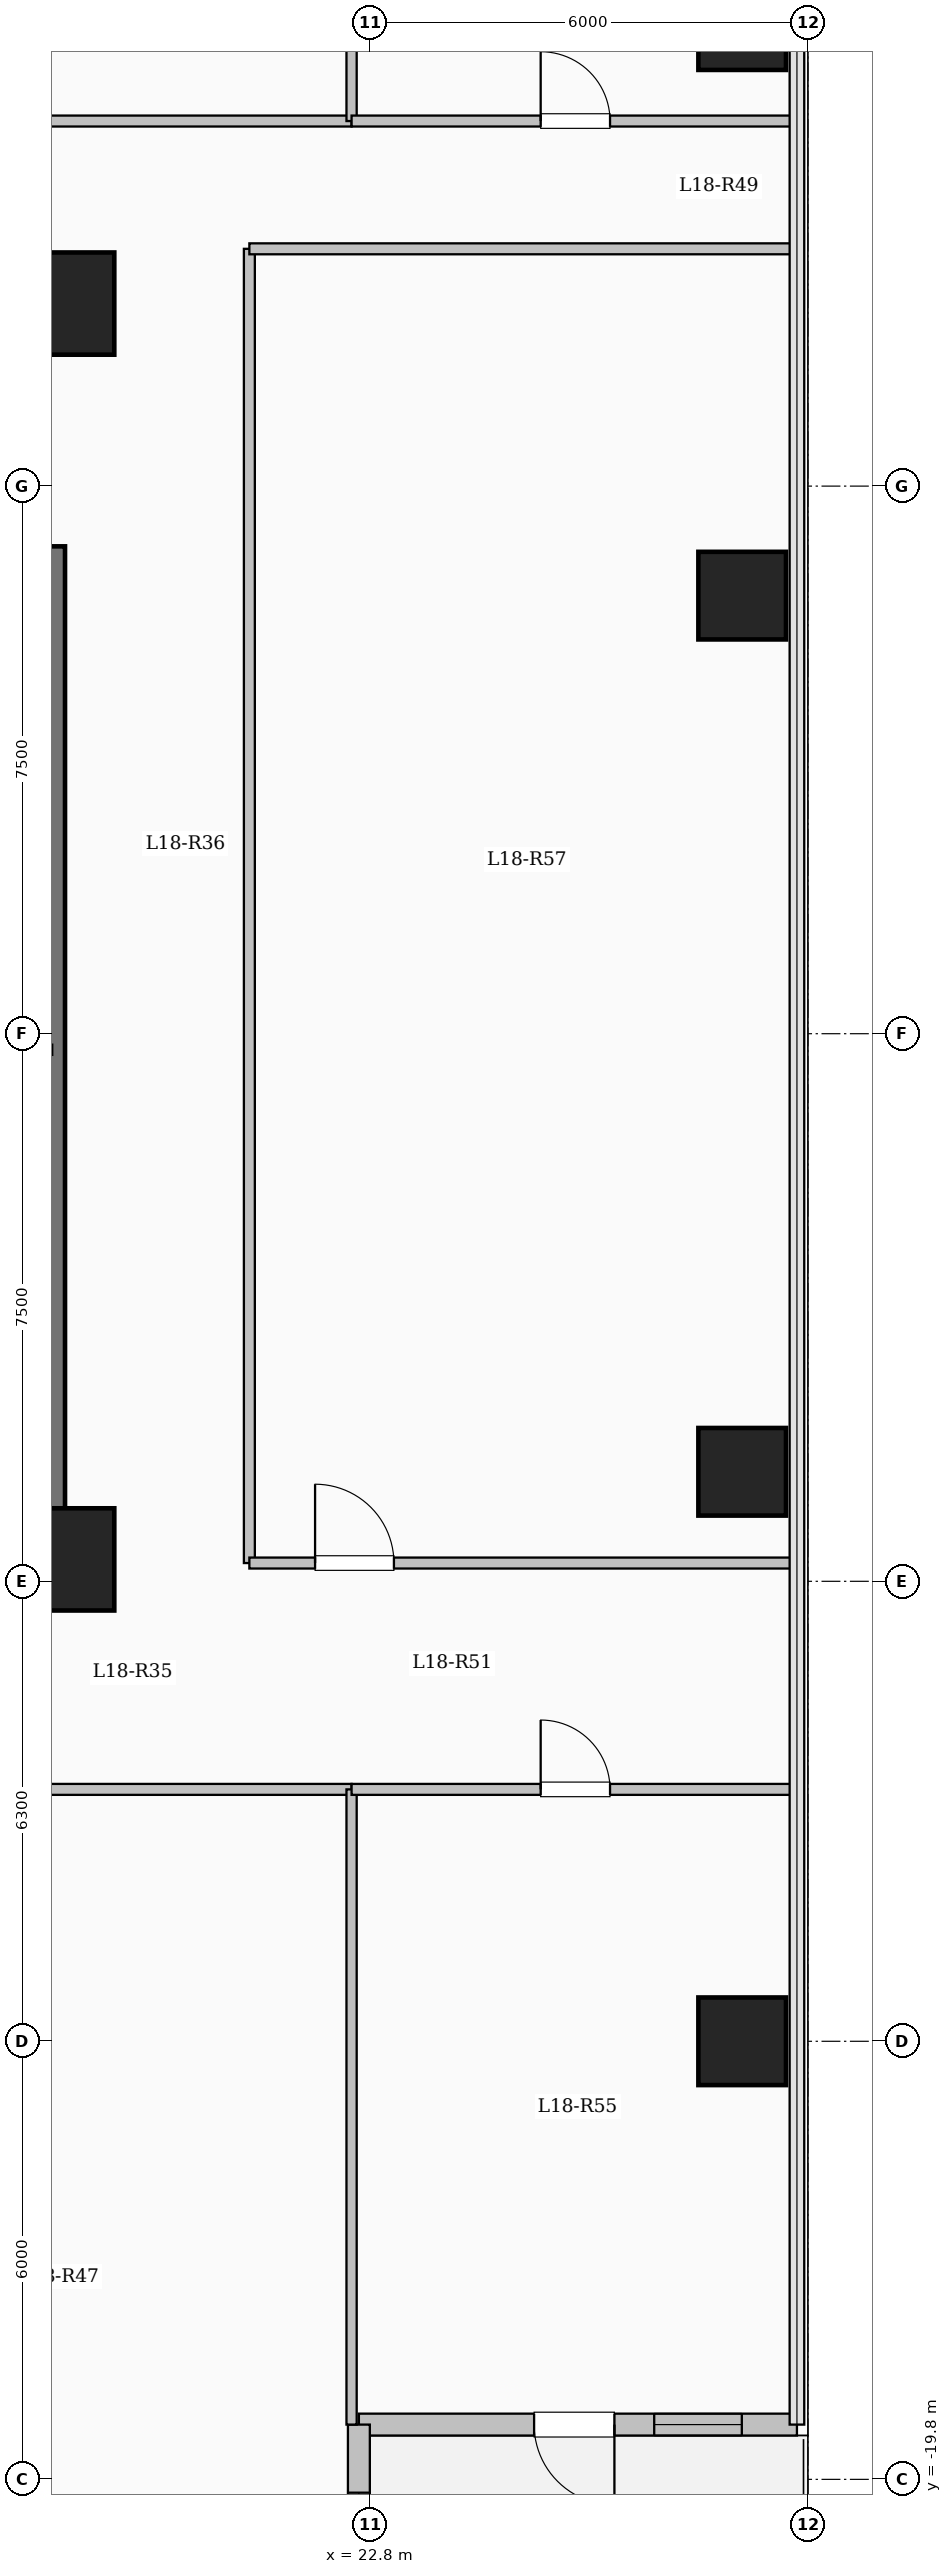
"""IFC4 building model, lengths in metres.
Left out: names, types, materials, properties, quantities, classifications, styles, units other than length and angle.
Written with IfcOpenShell. Run it as: python <this file> out.ifc"""

import sys

from ifc_helpers import new_model, si_unit, direction, frame, frame_2d, origin, origin_2d, place, context, subcontext, project, spatial, rectangle, extrude, element, fill, save


model = new_model("IFC4")
c1 = context("Model", 3, precision=1e-05, world=origin(), true_north=direction((0.0, 1.0)))
c2 = subcontext(c1, "Body", "Model", "MODEL_VIEW")
j1 = project(units=[si_unit("LENGTHUNIT", "METRE"), si_unit("PLANEANGLEUNIT", "RADIAN")], contexts=[c1])
p1 = place(None, origin())
s1 = spatial("IfcSite", under=j1, at=p1, CompositionType="ELEMENT")
p2 = place(p1, origin())
s2 = spatial("IfcBuilding", under=s1, at=p2, CompositionType="ELEMENT")
p3 = place(p2, frame((0.0, 0.0, 68.7)))
s3 = spatial("IfcBuildingStorey", under=s2, at=p3, CompositionType="ELEMENT", Elevation=68.7)
for number, where, z_axis, x_axis in (
    (1, (18.6, -7.2, 0.0), (0.0, 0.0, 1.0), (1.0, 0.0, 0.0)),
    (2, (18.6, 10.0, 0.0), (0.0, 0.0, 1.0), (1.0, 0.0, 0.0)),
):
    element("IfcColumn", number, at=place(p3, frame(where, z_axis=z_axis, x_axis=x_axis)), inside=s3, PredefinedType="COLUMN", context=c2, shape_type="SweptSolid", body=[
        extrude(rectangle(XDim=1.4, YDim=1.4, at=origin_2d()), origin(), (0.0, 0.0, 1.0), 4.5),
    ])
for number, where, z_axis, x_axis in (
    (3, (27.9, -13.8, 0.0), (0.0, 0.0, 1.0), (1.0, 0.0, 0.0)),
    (4, (27.9, -6.0, 0.0), (0.0, 0.0, 1.0), (1.0, 0.0, 0.0)),
    (5, (27.9, 6.0, 0.0), (0.0, 0.0, 1.0), (1.0, 0.0, 0.0)),
    (6, (27.9, 13.8, 0.0), (0.0, 0.0, 1.0), (1.0, 0.0, 0.0)),
):
    element("IfcColumn", number, at=place(p3, frame(where, z_axis=z_axis, x_axis=x_axis)), inside=s3, PredefinedType="COLUMN", context=c2, shape_type="SweptSolid", body=[
        extrude(rectangle(XDim=1.2, YDim=1.2, at=origin_2d()), origin(), (0.0, 0.0, 1.0), 4.5),
    ])
p4 = place(p3, frame((28.65, -19.05, 0.0), z_axis=(0.0, 0.0, 1.0), x_axis=(-1.0, 0.0, 0.0)))
e7 = element("IfcWall", 7, at=p4, inside=s3, PredefinedType="SOLIDWALL", context=c2, shape_type="SweptSolid", body=[
    extrude(rectangle(XDim=6.0, YDim=0.3, at=frame_2d((3.0, 0.0))), origin(), (0.0, 0.0, 1.0), 4.2),
])
p5 = place(p4, frame((2.5, 0.0, 0.0)))
e8 = element("IfcOpeningElement", 8, at=p5, cuts=e7, PredefinedType="OPENING", context=c2, shape_type="SweptSolid", body=[
    extrude(rectangle(XDim=1.1, YDim=2.2, at=frame_2d((0.55, 1.1))), frame((0.0, 0.16, 0.0), z_axis=(0.0, -1.0, 0.0), x_axis=(1.0, 0.0, 0.0)), (0.0, 0.0, 1.0), 0.32),
])
p6 = place(p4, frame((0.755, 0.0, 0.95)))
e9 = element("IfcOpeningElement", 9, at=p6, cuts=e7, PredefinedType="OPENING", context=c2, shape_type="SweptSolid", body=[
    extrude(rectangle(XDim=1.2, YDim=1.5, at=frame_2d((0.6, 0.75))), frame((0.0, 0.16, 0.0), z_axis=(0.0, -1.0, 0.0), x_axis=(1.0, 0.0, 0.0)), (0.0, 0.0, 1.0), 0.32),
])
p7 = place(p3, frame((22.65, -19.05, 0.0), z_axis=(0.0, 0.0, 1.0), x_axis=(0.0, -1.0, 0.0)))
e10 = element("IfcWall", 10, at=p7, inside=s3, PredefinedType="SOLIDWALL", context=c2, shape_type="SweptSolid", body=[
    extrude(rectangle(XDim=4.5, YDim=0.3, at=frame_2d((2.25, 0.0))), origin(), (0.0, 0.0, 1.0), 4.2),
])
p8 = place(p7, frame((0.933, 0.0, 0.85)))
e11 = element("IfcOpeningElement", 11, at=p8, cuts=e10, PredefinedType="OPENING", context=c2, shape_type="SweptSolid", body=[
    extrude(rectangle(XDim=2.6, YDim=2.4, at=frame_2d((1.3, 1.2))), frame((0.0, 0.16, 0.0), z_axis=(0.0, -1.0, 0.0), x_axis=(1.0, 0.0, 0.0)), (0.0, 0.0, 1.0), 0.32),
])
p9 = place(p3, frame((18.45, -7.375, 0.0), z_axis=(0.0, 0.0, 1.0), x_axis=(0.0, 1.0, 0.0)))
e12 = element("IfcWall", 12, at=p9, inside=s3, PredefinedType="SHEAR", context=c2, shape_type="SweptSolid", body=[
    extrude(rectangle(XDim=14.05, YDim=0.35, at=frame_2d((7.025, 0.0))), origin(), (0.0, 0.0, 1.0), 4.5),
])
p10 = place(p3, frame((10.075, -7.2, 0.0), z_axis=(0.0, 0.0, 1.0), x_axis=(1.0, 0.0, 0.0)))
e13 = element("IfcWall", 13, at=p10, inside=s3, PredefinedType="SHEAR", context=c2, shape_type="SweptSolid", body=[
    extrude(rectangle(XDim=8.55, YDim=0.35, at=frame_2d((4.275, 0.0))), origin(), (0.0, 0.0, 1.0), 4.5),
])
p11 = place(p3, frame((3.85, 12.5, 0.0), z_axis=(0.0, 0.0, 1.0), x_axis=(1.0, 0.0, 0.0)))
e14 = element("IfcWall", 14, at=p11, inside=s3, PredefinedType="PARTITIONING", context=c2, shape_type="SweptSolid", body=[
    extrude(rectangle(XDim=18.7, YDim=0.15, at=frame_2d((9.35, 0.0))), origin(), (0.0, 0.0, 1.0), 4.2),
])
p12 = place(p11, frame((0.8, 0.0, 0.0)))
e15 = element("IfcOpeningElement", 15, at=p12, cuts=e14, PredefinedType="OPENING", context=c2, shape_type="SweptSolid", body=[
    extrude(rectangle(XDim=0.95, YDim=2.15, at=frame_2d((0.475, 1.075))), frame((0.0, 0.085, 0.0), z_axis=(0.0, -1.0, 0.0), x_axis=(1.0, 0.0, 0.0)), (0.0, 0.0, 1.0), 0.17),
])
p13 = place(p11, frame((3.6, 0.0, 0.0)))
e16 = element("IfcOpeningElement", 16, at=p13, cuts=e14, PredefinedType="OPENING", context=c2, shape_type="SweptSolid", body=[
    extrude(rectangle(XDim=0.95, YDim=2.15, at=frame_2d((0.475, 1.075))), frame((0.0, 0.085, 0.0), z_axis=(0.0, -1.0, 0.0), x_axis=(1.0, 0.0, 0.0)), (0.0, 0.0, 1.0), 0.17),
])
p14 = place(p11, frame((6.55, 0.0, 0.0)))
e17 = element("IfcOpeningElement", 17, at=p14, cuts=e14, PredefinedType="OPENING", context=c2, shape_type="SweptSolid", body=[
    extrude(rectangle(XDim=1.08, YDim=2.15, at=frame_2d((0.54, 1.075))), frame((0.0, 0.085, 0.0), z_axis=(0.0, -1.0, 0.0), x_axis=(1.0, 0.0, 0.0)), (0.0, 0.0, 1.0), 0.17),
])
p15 = place(p11, frame((11.97, 0.0, 0.0)))
e18 = element("IfcOpeningElement", 18, at=p15, cuts=e14, PredefinedType="OPENING", context=c2, shape_type="SweptSolid", body=[
    extrude(rectangle(XDim=1.2, YDim=2.15, at=frame_2d((0.6, 1.075))), frame((0.0, 0.085, 0.0), z_axis=(0.0, -1.0, 0.0), x_axis=(1.0, 0.0, 0.0)), (0.0, 0.0, 1.0), 0.17),
])
p16 = place(p3, frame((21.15, -7.25, 0.0), z_axis=(0.0, 0.0, 1.0), x_axis=(0.0, 1.0, 0.0)))
e19 = element("IfcWall", 19, at=p16, inside=s3, PredefinedType="PARTITIONING", context=c2, shape_type="SweptSolid", body=[
    extrude(rectangle(XDim=18.0, YDim=0.15, at=frame_2d((9.0, 0.0))), origin(), (0.0, 0.0, 1.0), 3.635),
])
p17 = place(p3, frame((8.55, -10.35, 0.0), z_axis=(0.0, 0.0, 1.0), x_axis=(1.0, 0.0, 0.0)))
e20 = element("IfcWall", 20, at=p17, inside=s3, PredefinedType="PARTITIONING", context=c2, shape_type="SweptSolid", body=[
    extrude(rectangle(XDim=14.0, YDim=0.15, at=frame_2d((7.0, 0.0))), origin(), (0.0, 0.0, 1.0), 4.2),
])
p18 = place(p17, frame((1.1, 0.0, 0.0)))
e21 = element("IfcOpeningElement", 21, at=p18, cuts=e20, PredefinedType="OPENING", context=c2, shape_type="SweptSolid", body=[
    extrude(rectangle(XDim=1.08, YDim=2.15, at=frame_2d((0.54, 1.075))), frame((0.0, 0.085, 0.0), z_axis=(0.0, -1.0, 0.0), x_axis=(1.0, 0.0, 0.0)), (0.0, 0.0, 1.0), 0.17),
])
p19 = place(p17, frame((6.909, 0.0, 0.0)))
e22 = element("IfcOpeningElement", 22, at=p19, cuts=e20, PredefinedType="OPENING", context=c2, shape_type="SweptSolid", body=[
    extrude(rectangle(XDim=1.2, YDim=2.15, at=frame_2d((0.6, 1.075))), frame((0.0, 0.085, 0.0), z_axis=(0.0, -1.0, 0.0), x_axis=(1.0, 0.0, 0.0)), (0.0, 0.0, 1.0), 0.17),
])
p20 = place(p3, frame((21.15, -7.25, 0.0), z_axis=(0.0, 0.0, 1.0), x_axis=(1.0, 0.0, 0.0)))
e23 = element("IfcWall", 23, at=p20, inside=s3, PredefinedType="PARTITIONING", context=c2, shape_type="SweptSolid", body=[
    extrude(rectangle(XDim=7.53, YDim=0.15, at=frame_2d((3.765, 0.0))), origin(), (0.0, 0.0, 1.0), 4.2),
])
p21 = place(p20, frame((0.9, 0.0, 0.0)))
e24 = element("IfcOpeningElement", 24, at=p21, cuts=e23, PredefinedType="OPENING", context=c2, shape_type="SweptSolid", body=[
    extrude(rectangle(XDim=1.08, YDim=2.15, at=frame_2d((0.54, 1.075))), frame((0.0, 0.085, 0.0), z_axis=(0.0, -1.0, 0.0), x_axis=(1.0, 0.0, 0.0)), (0.0, 0.0, 1.0), 0.17),
])
p22 = place(p3, frame((21.15, 10.75, 0.0), z_axis=(0.0, 0.0, 1.0), x_axis=(1.0, 0.0, 0.0)))
e25 = element("IfcWall", 25, at=p22, inside=s3, PredefinedType="PARTITIONING", context=c2, shape_type="SweptSolid", body=[
    extrude(rectangle(XDim=7.53, YDim=0.15, at=frame_2d((3.765, 0.0))), origin(), (0.0, 0.0, 1.0), 4.2),
])
p23 = place(p3, frame((22.55, -19.05, 0.0), z_axis=(0.0, 0.0, 1.0), x_axis=(0.0, 1.0, 0.0)))
e26 = element("IfcWall", 26, at=p23, inside=s3, PredefinedType="PARTITIONING", context=c2, shape_type="SweptSolid", body=[
    extrude(rectangle(XDim=8.7, YDim=0.14, at=frame_2d((4.35, 0.0))), origin(), (0.0, 0.0, 1.0), 4.2),
])
p24 = place(p3, frame((22.55, 12.5, 0.0), z_axis=(0.0, 0.0, 1.0), x_axis=(0.0, 1.0, 0.0)))
e27 = element("IfcWall", 27, at=p24, inside=s3, PredefinedType="PARTITIONING", context=c2, shape_type="SweptSolid", body=[
    extrude(rectangle(XDim=6.55, YDim=0.14, at=frame_2d((3.275, 0.0))), origin(), (0.0, 0.0, 1.0), 4.2),
])
p25 = place(p3, frame((22.55, 12.5, 0.0), z_axis=(0.0, 0.0, 1.0), x_axis=(1.0, 0.0, 0.0)))
e28 = element("IfcWall", 28, at=p25, inside=s3, PredefinedType="PARTITIONING", context=c2, shape_type="SweptSolid", body=[
    extrude(rectangle(XDim=6.13, YDim=0.15, at=frame_2d((3.065, 0.0))), origin(), (0.0, 0.0, 1.0), 4.2),
])
p26 = place(p25, frame((2.59, 0.0, 0.0)))
e29 = element("IfcOpeningElement", 29, at=p26, cuts=e28, PredefinedType="OPENING", context=c2, shape_type="SweptSolid", body=[
    extrude(rectangle(XDim=0.95, YDim=2.15, at=frame_2d((0.475, 1.075))), frame((0.0, 0.085, 0.0), z_axis=(0.0, -1.0, 0.0), x_axis=(1.0, 0.0, 0.0)), (0.0, 0.0, 1.0), 0.17),
])
p27 = place(p3, frame((22.55, -10.35, 0.0), z_axis=(0.0, 0.0, 1.0), x_axis=(1.0, 0.0, 0.0)))
e30 = element("IfcWall", 30, at=p27, inside=s3, PredefinedType="PARTITIONING", context=c2, shape_type="SweptSolid", body=[
    extrude(rectangle(XDim=6.13, YDim=0.15, at=frame_2d((3.065, 0.0))), origin(), (0.0, 0.0, 1.0), 4.2),
])
p28 = place(p27, frame((2.59, 0.0, 0.0)))
e31 = element("IfcOpeningElement", 31, at=p28, cuts=e30, PredefinedType="OPENING", context=c2, shape_type="SweptSolid", body=[
    extrude(rectangle(XDim=0.95, YDim=2.15, at=frame_2d((0.475, 1.075))), frame((0.0, 0.085, 0.0), z_axis=(0.0, -1.0, 0.0), x_axis=(1.0, 0.0, 0.0)), (0.0, 0.0, 1.0), 0.17),
])
p29 = place(p5, origin())
e32 = element("IfcDoor", 32, at=p29, inside=s3, OperationType="SINGLE_SWING_LEFT", PredefinedType="DOOR", context=c2, shape_type="SweptSolid", body=[
    extrude(rectangle(XDim=1.1, YDim=2.2, at=frame_2d((0.55, 1.1))), frame((0.0, 0.025, 0.0), z_axis=(0.0, -1.0, 0.0), x_axis=(1.0, 0.0, 0.0)), (0.0, 0.0, 1.0), 0.05),
])
fill(e8, e32)
p30 = place(p6, origin())
e33 = element("IfcWindow", 33, at=p30, inside=s3, PartitioningType="SINGLE_PANEL", PredefinedType="WINDOW", context=c2, shape_type="SweptSolid", body=[
    extrude(rectangle(XDim=1.2, YDim=1.5, at=frame_2d((0.6, 0.75))), frame((0.0, 0.03, 0.0), z_axis=(0.0, -1.0, 0.0), x_axis=(1.0, 0.0, 0.0)), (0.0, 0.0, 1.0), 0.06),
])
fill(e9, e33)
p31 = place(p8, origin())
e34 = element("IfcWindow", 34, at=p31, inside=s3, PartitioningType="SINGLE_PANEL", PredefinedType="WINDOW", context=c2, shape_type="SweptSolid", body=[
    extrude(rectangle(XDim=2.6, YDim=2.4, at=frame_2d((1.3, 1.2))), frame((0.0, 0.03, 0.0), z_axis=(0.0, -1.0, 0.0), x_axis=(1.0, 0.0, 0.0)), (0.0, 0.0, 1.0), 0.06),
])
fill(e11, e34)
p32 = place(p26, origin())
e35 = element("IfcDoor", 35, at=p32, inside=s3, OperationType="SINGLE_SWING_LEFT", PredefinedType="DOOR", context=c2, shape_type="SweptSolid", body=[
    extrude(rectangle(XDim=0.95, YDim=2.15, at=frame_2d((0.475, 1.075))), frame((0.0, 0.025, 0.0), z_axis=(0.0, -1.0, 0.0), x_axis=(1.0, 0.0, 0.0)), (0.0, 0.0, 1.0), 0.05),
])
fill(e29, e35)
p33 = place(p28, origin())
e36 = element("IfcDoor", 36, at=p33, inside=s3, OperationType="SINGLE_SWING_LEFT", PredefinedType="DOOR", context=c2, shape_type="SweptSolid", body=[
    extrude(rectangle(XDim=0.95, YDim=2.15, at=frame_2d((0.475, 1.075))), frame((0.0, 0.025, 0.0), z_axis=(0.0, -1.0, 0.0), x_axis=(1.0, 0.0, 0.0)), (0.0, 0.0, 1.0), 0.05),
])
fill(e31, e36)
p34 = place(p21, origin())
e37 = element("IfcDoor", 37, at=p34, inside=s3, OperationType="SINGLE_SWING_LEFT", PredefinedType="DOOR", context=c2, shape_type="SweptSolid", body=[
    extrude(rectangle(XDim=1.08, YDim=2.15, at=frame_2d((0.54, 1.075))), frame((0.0, 0.025, 0.0), z_axis=(0.0, -1.0, 0.0), x_axis=(1.0, 0.0, 0.0)), (0.0, 0.0, 1.0), 0.05),
])
fill(e24, e37)
save(model, sys.argv[1])
